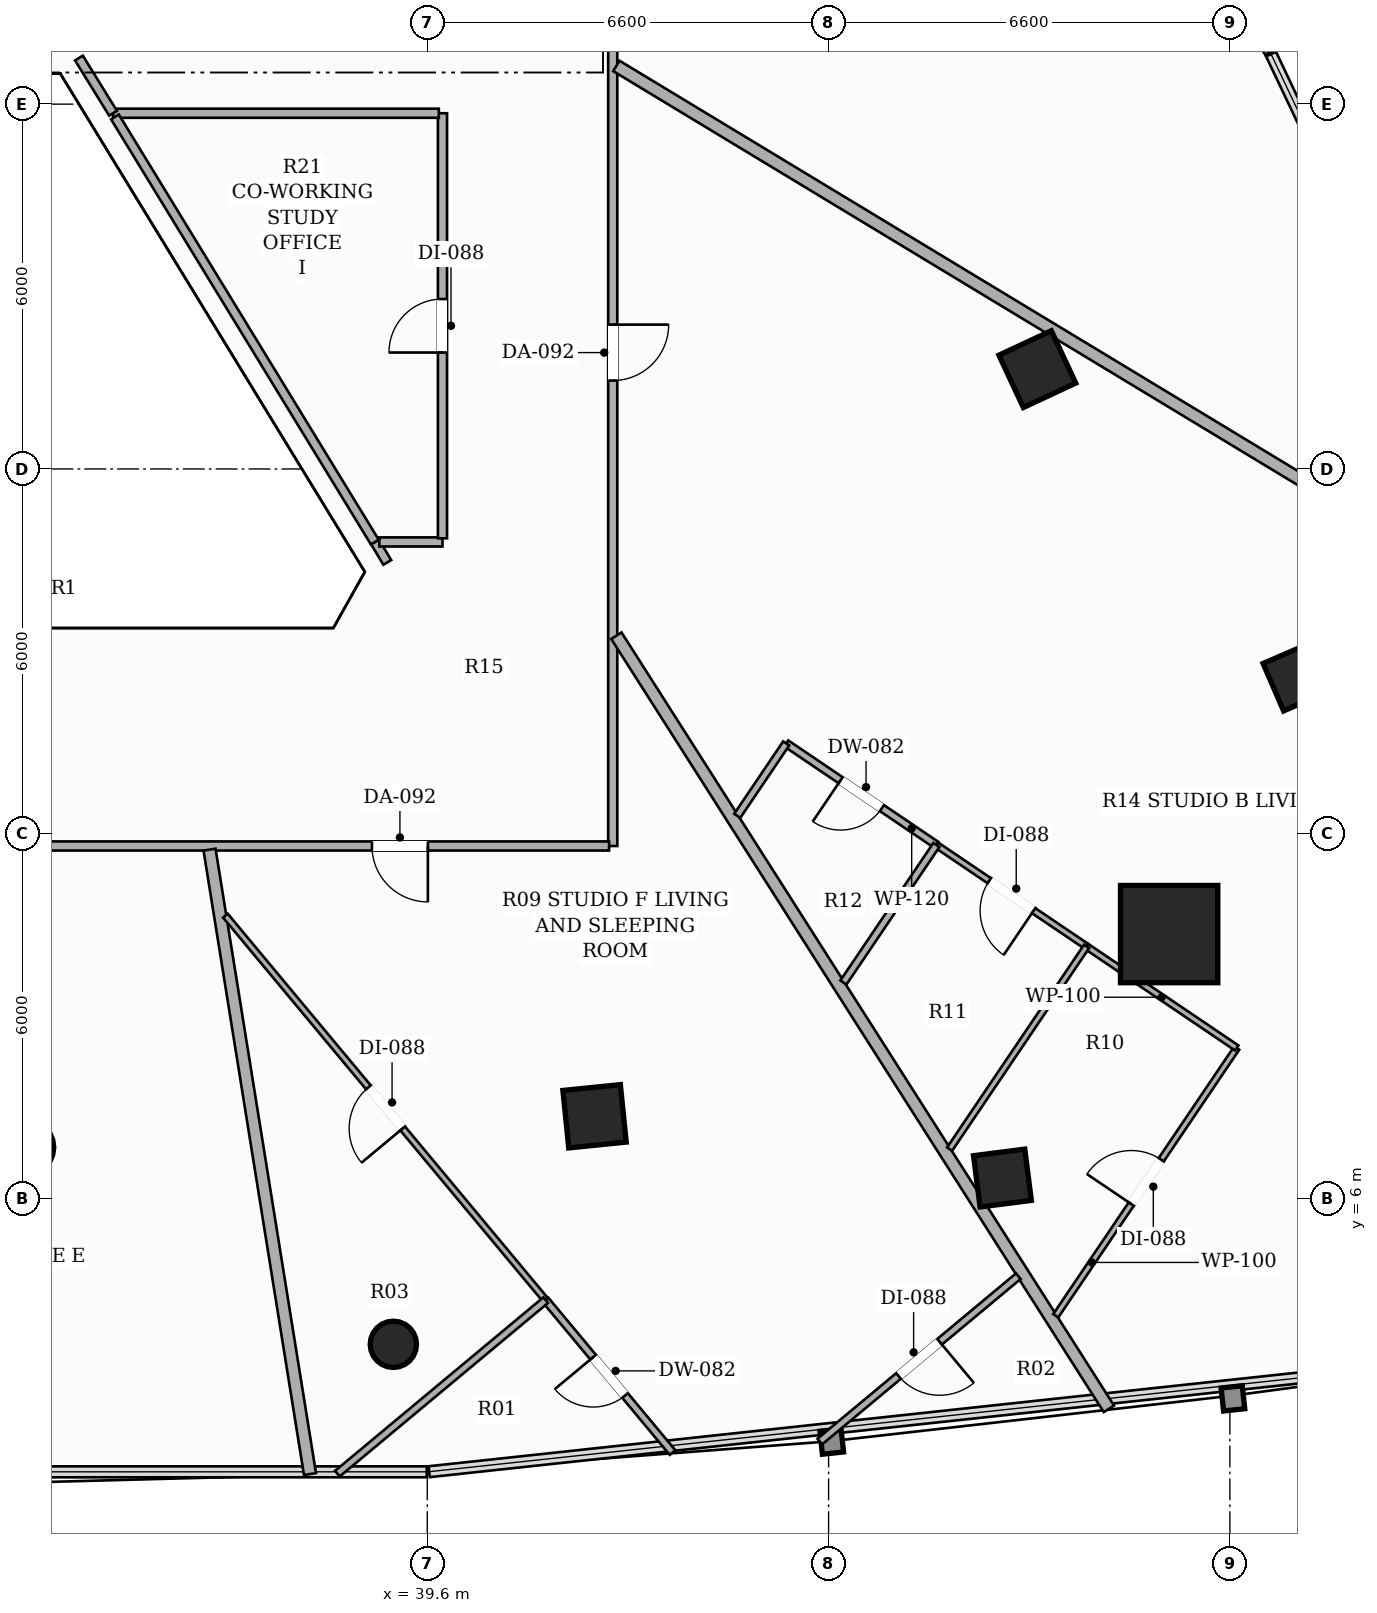
"""IFC4 building model, lengths in metres.
Left out: names, types, materials, properties, quantities, classifications, styles, units other than length and angle.
Written with IfcOpenShell. Run it as: python <this file> out.ifc"""

import sys

from ifc_helpers import new_model, si_unit, direction, frame, frame_2d, origin, origin_2d, place, context, subcontext, project, spatial, rectangle, hollow_rectangle, hollow_circle, extrude, element, fill, save


model = new_model("IFC4")
c1 = context("Model", 3, precision=1e-05, world=origin(), true_north=direction((0.0, 1.0)))
c2 = subcontext(c1, "Body", "Model", "MODEL_VIEW")
j1 = project(units=[si_unit("LENGTHUNIT", "METRE"), si_unit("PLANEANGLEUNIT", "RADIAN")], contexts=[c1])
p1 = place(None, origin())
s1 = spatial("IfcSite", under=j1, at=p1, CompositionType="ELEMENT")
p2 = place(p1, origin())
s2 = spatial("IfcBuilding", under=s1, at=p2, CompositionType="ELEMENT")
p3 = place(p2, frame((0.0, 0.0, 50.0)))
s3 = spatial("IfcBuildingStorey", under=s2, at=p3, CompositionType="ELEMENT", Elevation=50.0)
p4 = place(p3, frame((51.801, 10.351, 0.0), z_axis=(0.0, 0.0, 1.0), x_axis=(1.0, 0.0, 0.0)))
e1 = element("IfcColumn", 1, at=p4, inside=s3, PredefinedType="COLUMN", context=c2, shape_type="SweptSolid", body=[
    extrude(hollow_rectangle(XDim=1.6, YDim=1.6, WallThickness=0.05, at=origin_2d()), origin(), (0.0, 0.0, 1.0), 3.3),
])
p5 = place(p3, frame((33.0, 6.844, 0.0), z_axis=(0.0, 0.0, 1.0), x_axis=(1.0, 0.0, 0.0)))
e2 = element("IfcColumn", 2, at=p5, inside=s3, PredefinedType="COLUMN", context=c2, shape_type="SweptSolid", body=[
    extrude(hollow_circle(Radius=0.457, WallThickness=0.025, at=origin_2d()), origin(), (0.0, 0.0, 1.0), 3.3),
])
for number, where, z_axis, x_axis in (
    (3, (42.351, 7.355, 0.0), (0.0, 0.0, 1.0), (0.995, 0.101, 0.0)),
    (4, (49.633, 19.642, 0.0), (0.0, 0.0, 1.0), (-0.423, 0.906, 0.0)),
):
    element("IfcColumn", number, at=place(p3, frame(where, z_axis=z_axis, x_axis=x_axis)), inside=s3, PredefinedType="COLUMN", context=c2, shape_type="SweptSolid", body=[
        extrude(hollow_rectangle(XDim=0.95, YDim=0.95, WallThickness=0.032, at=origin_2d()), origin(), (0.0, 0.0, 1.0), 3.3),
    ])
for number, where, z_axis, x_axis in (
    (5, (49.059, 6.339, 0.0), (0.0, 0.0, 1.0), (0.992, 0.127, 0.0)),
    (6, (53.905, 14.58, 0.0), (0.0, 0.0, 1.0), (-0.397, 0.918, 0.0)),
):
    element("IfcColumn", number, at=place(p3, frame(where, z_axis=z_axis, x_axis=x_axis)), inside=s3, PredefinedType="COLUMN", context=c2, shape_type="SweptSolid", body=[
        extrude(hollow_rectangle(XDim=0.85, YDim=0.85, WallThickness=0.028, at=origin_2d()), origin(), (0.0, 0.0, 1.0), 3.3),
    ])
p6 = place(p3, frame((39.042, 3.605, 0.0), z_axis=(0.0, 0.0, 1.0), x_axis=(1.0, 0.0, 0.0)))
e7 = element("IfcColumn", 7, at=p6, inside=s3, PredefinedType="COLUMN", context=c2, shape_type="SweptSolid", body=[
    extrude(hollow_circle(Radius=0.381, WallThickness=0.022, at=origin_2d()), origin(), (0.0, 0.0, 1.0), 3.3),
])
p7 = place(p3, frame((42.65, 36.84, 0.0), z_axis=(0.0, 0.0, 1.0), x_axis=(0.0, -1.0, 0.0)))
e8 = element("IfcWall", 8, at=p7, inside=s3, PredefinedType="PARTITIONING", context=c2, shape_type="SweptSolid", body=[
    extrude(rectangle(XDim=25.04, YDim=0.15, at=frame_2d((12.52, 0.0))), origin(), (0.0, 0.0, 1.0), 2.413),
])
p8 = place(p7, frame((16.466, 0.0, 0.0)))
e9 = element("IfcOpeningElement", 9, at=p8, cuts=e8, PredefinedType="OPENING", context=c2, shape_type="SweptSolid", body=[
    extrude(rectangle(XDim=0.92, YDim=2.15, at=frame_2d((0.46, 1.075))), frame((0.0, 0.085, 0.0), z_axis=(0.0, -1.0, 0.0), x_axis=(1.0, 0.0, 0.0)), (0.0, 0.0, 1.0), 0.17),
])
p9 = place(p7, frame((5.796, 0.0, 0.0)))
e10 = element("IfcOpeningElement", 10, at=p9, cuts=e8, PredefinedType="OPENING", context=c2, shape_type="SweptSolid", body=[
    extrude(rectangle(XDim=0.92, YDim=2.15, at=frame_2d((0.46, 1.075))), frame((0.0, 0.085, 0.0), z_axis=(0.0, -1.0, 0.0), x_axis=(1.0, 0.0, 0.0)), (0.0, 0.0, 1.0), 0.17),
])
p10 = place(p3, frame((42.59, 11.8, 0.0), z_axis=(0.0, 0.0, 1.0), x_axis=(-1.0, 0.0, 0.0)))
e11 = element("IfcWall", 11, at=p10, inside=s3, PredefinedType="PARTITIONING", context=c2, shape_type="SweptSolid", body=[
    extrude(rectangle(XDim=19.24, YDim=0.15, at=frame_2d((9.62, 0.0))), origin(), (0.0, 0.0, 1.0), 2.669),
])
p11 = place(p10, frame((10.508, 0.0, 0.0)))
e12 = element("IfcOpeningElement", 12, at=p11, cuts=e11, PredefinedType="OPENING", context=c2, shape_type="SweptSolid", body=[
    extrude(rectangle(XDim=0.88, YDim=2.1, at=frame_2d((0.44, 1.05))), frame((0.0, 0.085, 0.0), z_axis=(0.0, -1.0, 0.0), x_axis=(1.0, 0.0, 0.0)), (0.0, 0.0, 1.0), 0.17),
])
p12 = place(p10, frame((2.98, 0.0, 0.0)))
e13 = element("IfcOpeningElement", 13, at=p12, cuts=e11, PredefinedType="OPENING", context=c2, shape_type="SweptSolid", body=[
    extrude(rectangle(XDim=0.92, YDim=2.15, at=frame_2d((0.46, 1.075))), frame((0.0, 0.085, 0.0), z_axis=(0.0, -1.0, 0.0), x_axis=(1.0, 0.0, 0.0)), (0.0, 0.0, 1.0), 0.17),
])
p13 = place(p3, frame((38.942, 16.463, 0.0), z_axis=(0.0, 0.0, 1.0), x_axis=(-0.511932152937, 0.859025884819, 0.0)))
e14 = element("IfcWall", 14, at=p13, inside=s3, PredefinedType="PARTITIONING", context=c2, shape_type="SweptSolid", body=[
    extrude(rectangle(XDim=0.393, YDim=0.15, at=frame_2d((0.196, 0.0))), origin(), (0.0, 0.0, 1.0), 3.06),
])
p14 = place(p3, frame((38.811, 16.8, 0.0), z_axis=(0.0, 0.0, 1.0), x_axis=(1.0, 0.0, 0.0)))
e15 = element("IfcWall", 15, at=p14, inside=s3, PredefinedType="PARTITIONING", context=c2, shape_type="SweptSolid", body=[
    extrude(rectangle(XDim=1.039, YDim=0.15, at=frame_2d((0.52, 0.0))), origin(), (0.0, 0.0, 1.0), 3.06),
])
p15 = place(p3, frame((39.85, 16.86, 0.0), z_axis=(0.0, 0.0, 1.0), x_axis=(0.0, 1.0, 0.0)))
e16 = element("IfcWall", 16, at=p15, inside=s3, PredefinedType="PARTITIONING", context=c2, shape_type="SweptSolid", body=[
    extrude(rectangle(XDim=6.99, YDim=0.15, at=frame_2d((3.495, 0.0))), origin(), (0.0, 0.0, 1.0), 2.669),
])
p16 = place(p15, frame((3.055, 0.0, 0.0)))
e17 = element("IfcOpeningElement", 17, at=p16, cuts=e16, PredefinedType="OPENING", context=c2, shape_type="SweptSolid", body=[
    extrude(rectangle(XDim=0.88, YDim=2.1, at=frame_2d((0.44, 1.05))), frame((0.0, 0.085, 0.0), z_axis=(0.0, -1.0, 0.0), x_axis=(1.0, 0.0, 0.0)), (0.0, 0.0, 1.0), 0.17),
])
p17 = place(p3, frame((39.79, 23.85, 0.0), z_axis=(0.0, 0.0, 1.0), x_axis=(-1.0, 0.0, 0.0)))
e18 = element("IfcWall", 18, at=p17, inside=s3, PredefinedType="PARTITIONING", context=c2, shape_type="SweptSolid", body=[
    extrude(rectangle(XDim=5.358, YDim=0.15, at=frame_2d((2.679, 0.0))), origin(), (0.0, 0.0, 1.0), 2.669),
])
p18 = place(p3, frame((34.432, 23.85, 0.0), z_axis=(0.0, 0.0, 1.0), x_axis=(-0.525488010188, 0.850801005611, 0.0)))
e19 = element("IfcWall", 19, at=p18, inside=s3, PredefinedType="PARTITIONING", context=c2, shape_type="SweptSolid", body=[
    extrude(rectangle(XDim=1.067, YDim=0.15, at=frame_2d((0.534, 0.0))), origin(), (0.0, 0.0, 1.0), 3.06),
])
p19 = place(p3, frame((34.463, 23.79, 0.0), z_axis=(0.0, 0.0, 1.0), x_axis=(0.521566895949, -0.853210392019, 0.0)))
e20 = element("IfcWall", 20, at=p19, inside=s3, PredefinedType="PARTITIONING", context=c2, shape_type="SweptSolid", body=[
    extrude(rectangle(XDim=8.195, YDim=0.15, at=frame_2d((4.097, 0.0))), origin(), (0.0, 0.0, 1.0), 2.669),
])
p20 = place(p3, frame((42.71, 24.628, 0.0), z_axis=(0.0, 0.0, 1.0), x_axis=(0.85570509792, -0.517463801047, 0.0)))
e21 = element("IfcWall", 21, at=p20, inside=s3, PredefinedType="PARTITIONING", context=c2, shape_type="SweptSolid", body=[
    extrude(rectangle(XDim=17.86, YDim=0.2, at=frame_2d((8.93, 0.0))), origin(), (0.0, 0.0, 1.0), 2.413),
])
p21 = place(p3, frame((50.81, 2.544, 0.0), z_axis=(0.0, 0.0, 1.0), x_axis=(-0.537314491885, 0.843381963769, 0.0)))
e22 = element("IfcWall", 22, at=p21, inside=s3, PredefinedType="PARTITIONING", context=c2, shape_type="SweptSolid", body=[
    extrude(rectangle(XDim=15.075, YDim=0.2, at=frame_2d((7.538, 0.0))), origin(), (0.0, 0.0, 1.0), 2.413),
])
p22 = place(p3, frame((36.019, 11.74, 0.0), z_axis=(0.0, 0.0, 1.0), x_axis=(0.158816201081, -0.98730816581, 0.0)))
e23 = element("IfcWall", 23, at=p22, inside=s3, PredefinedType="PARTITIONING", context=c2, shape_type="SweptSolid", body=[
    extrude(rectangle(XDim=10.401, YDim=0.2, at=frame_2d((5.201, 0.0))), origin(), (0.0, 0.0, 1.0), 2.413),
])
p23 = place(p3, frame((47.973, 11.817, 0.0), z_axis=(0.0, 0.0, 1.0), x_axis=(-0.82839181121, 0.560149093653, 0.0)))
e24 = element("IfcWall", 24, at=p23, inside=s3, PredefinedType="PARTITIONING", context=c2, shape_type="SweptSolid", body=[
    extrude(rectangle(XDim=2.982, YDim=0.12, at=frame_2d((1.491, 0.0))), origin(), (0.0, 0.0, 1.0), 2.669),
])
p24 = place(p23, frame((1.081, 0.0, 0.0)))
e25 = element("IfcOpeningElement", 25, at=p24, cuts=e24, PredefinedType="OPENING", context=c2, shape_type="SweptSolid", body=[
    extrude(rectangle(XDim=0.82, YDim=2.1, at=frame_2d((0.41, 1.05))), frame((0.0, 0.07, 0.0), z_axis=(0.0, -1.0, 0.0), x_axis=(1.0, 0.0, 0.0)), (0.0, 0.0, 1.0), 0.14),
])
p25 = place(p3, frame((45.503, 13.487, 0.0), z_axis=(0.0, 0.0, 1.0), x_axis=(-0.559901526605, -0.828559159328, 0.0)))
e26 = element("IfcWall", 26, at=p25, inside=s3, PredefinedType="PARTITIONING", context=c2, shape_type="SweptSolid", body=[
    extrude(rectangle(XDim=1.438, YDim=0.12, at=frame_2d((0.719, 0.0))), origin(), (0.0, 0.0, 1.0), 2.669),
])
p26 = place(p3, frame((49.936, 4.074, 0.0), z_axis=(0.0, 0.0, 1.0), x_axis=(0.560030395854, 0.828472060917, 0.0)))
e27 = element("IfcWall", 27, at=p26, inside=s3, PredefinedType="PARTITIONING", context=c2, shape_type="SweptSolid", body=[
    extrude(rectangle(XDim=5.316, YDim=0.1, at=frame_2d((2.658, 0.0))), origin(), (0.0, 0.0, 1.0), 3.06),
])
p27 = place(p26, frame((2.218, 0.0, 0.0)))
e28 = element("IfcOpeningElement", 28, at=p27, cuts=e27, PredefinedType="OPENING", context=c2, shape_type="SweptSolid", body=[
    extrude(rectangle(XDim=0.88, YDim=2.1, at=frame_2d((0.44, 1.05))), frame((0.0, 0.06, 0.0), z_axis=(0.0, -1.0, 0.0), x_axis=(1.0, 0.0, 0.0)), (0.0, 0.0, 1.0), 0.12),
])
p28 = place(p3, frame((52.913, 8.478, 0.0), z_axis=(0.0, 0.0, 1.0), x_axis=(-0.828429805787, 0.560092900226, 0.0)))
e29 = element("IfcWall", 29, at=p28, inside=s3, PredefinedType="PARTITIONING", context=c2, shape_type="SweptSolid", body=[
    extrude(rectangle(XDim=2.981, YDim=0.1, at=frame_2d((1.491, 0.0))), origin(), (0.0, 0.0, 1.0), 2.413),
])
p29 = place(p3, frame((50.443, 10.148, 0.0), z_axis=(0.0, 0.0, 1.0), x_axis=(-0.828607449923, 0.559830058082, 0.0)))
e30 = element("IfcWall", 30, at=p29, inside=s3, PredefinedType="PARTITIONING", context=c2, shape_type="SweptSolid", body=[
    extrude(rectangle(XDim=2.981, YDim=0.1, at=frame_2d((1.491, 0.0))), origin(), (0.0, 0.0, 1.0), 3.06),
])
p30 = place(p29, frame((1.051, 0.0, 0.0)))
e31 = element("IfcOpeningElement", 31, at=p30, cuts=e30, PredefinedType="OPENING", context=c2, shape_type="SweptSolid", body=[
    extrude(rectangle(XDim=0.88, YDim=2.1, at=frame_2d((0.44, 1.05))), frame((0.0, 0.06, 0.0), z_axis=(0.0, -1.0, 0.0), x_axis=(1.0, 0.0, 0.0)), (0.0, 0.0, 1.0), 0.12),
])
p31 = place(p3, frame((47.973, 11.817, 0.0), z_axis=(0.0, 0.0, 1.0), x_axis=(-0.559971898906, -0.828511600665, 0.0)))
e32 = element("IfcWall", 32, at=p31, inside=s3, PredefinedType="PARTITIONING", context=c2, shape_type="SweptSolid", body=[
    extrude(rectangle(XDim=2.73, YDim=0.12, at=frame_2d((1.365, 0.0))), origin(), (0.0, 0.0, 1.0), 2.669),
])
p32 = place(p3, frame((48.19, 6.815, 0.0), z_axis=(0.0, 0.0, 1.0), x_axis=(0.560052199206, 0.828457321873, 0.0)))
e33 = element("IfcWall", 33, at=p32, inside=s3, PredefinedType="PARTITIONING", context=c2, shape_type="SweptSolid", body=[
    extrude(rectangle(XDim=4.023, YDim=0.1, at=frame_2d((2.012, 0.0))), origin(), (0.0, 0.0, 1.0), 2.413),
])
p33 = place(p3, frame((43.634, 1.825, 0.0), z_axis=(0.0, 0.0, 1.0), x_axis=(-0.639911914418, 0.768448268777, 0.0)))
e34 = element("IfcWall", 34, at=p33, inside=s3, PredefinedType="PARTITIONING", context=c2, shape_type="SweptSolid", body=[
    extrude(rectangle(XDim=3.261, YDim=0.12, at=frame_2d((1.631, 0.0))), origin(), (0.0, 0.0, 1.0), 3.06),
])
p34 = place(p33, frame((1.221, 0.0, 0.0)))
e35 = element("IfcOpeningElement", 35, at=p34, cuts=e34, PredefinedType="OPENING", context=c2, shape_type="SweptSolid", body=[
    extrude(rectangle(XDim=0.82, YDim=2.1, at=frame_2d((0.41, 1.05))), frame((0.0, 0.07, 0.0), z_axis=(0.0, -1.0, 0.0), x_axis=(1.0, 0.0, 0.0)), (0.0, 0.0, 1.0), 0.14),
])
p35 = place(p3, frame((49.32, 4.725, 0.0), z_axis=(0.0, 0.0, 1.0), x_axis=(-0.768353158093, -0.640026112317, 0.0)))
e36 = element("IfcWall", 36, at=p35, inside=s3, PredefinedType="PARTITIONING", context=c2, shape_type="SweptSolid", body=[
    extrude(rectangle(XDim=4.248, YDim=0.12, at=frame_2d((2.124, 0.0))), origin(), (0.0, 0.0, 1.0), 3.06),
])
p36 = place(p35, frame((1.684, 0.0, 0.0)))
e37 = element("IfcOpeningElement", 37, at=p36, cuts=e36, PredefinedType="OPENING", context=c2, shape_type="SweptSolid", body=[
    extrude(rectangle(XDim=0.88, YDim=2.1, at=frame_2d((0.44, 1.05))), frame((0.0, 0.07, 0.0), z_axis=(0.0, -1.0, 0.0), x_axis=(1.0, 0.0, 0.0)), (0.0, 0.0, 1.0), 0.14),
])
p37 = place(p3, frame((41.547, 4.331, 0.0), z_axis=(0.0, 0.0, 1.0), x_axis=(-0.640035566376, 0.768345282913, 0.0)))
e38 = element("IfcWall", 38, at=p37, inside=s3, PredefinedType="PARTITIONING", context=c2, shape_type="SweptSolid", body=[
    extrude(rectangle(XDim=8.229, YDim=0.1, at=frame_2d((4.115, 0.0))), origin(), (0.0, 0.0, 1.0), 2.413),
])
p38 = place(p37, frame((3.675, 0.0, 0.0)))
e39 = element("IfcOpeningElement", 39, at=p38, cuts=e38, PredefinedType="OPENING", context=c2, shape_type="SweptSolid", body=[
    extrude(rectangle(XDim=0.88, YDim=2.1, at=frame_2d((0.44, 1.05))), frame((0.0, 0.06, 0.0), z_axis=(0.0, -1.0, 0.0), x_axis=(1.0, 0.0, 0.0)), (0.0, 0.0, 1.0), 0.12),
])
p39 = place(p3, frame((38.122, 1.478, 0.0), z_axis=(0.0, 0.0, 1.0), x_axis=(0.768351451836, 0.640028160678, 0.0)))
e40 = element("IfcWall", 40, at=p39, inside=s3, PredefinedType="PARTITIONING", context=c2, shape_type="SweptSolid", body=[
    extrude(rectangle(XDim=4.458, YDim=0.12, at=frame_2d((2.229, 0.0))), origin(), (0.0, 0.0, 1.0), 3.06),
])
p40 = place(p8, origin())
e41 = element("IfcDoor", 41, at=p40, inside=s3, OperationType="SINGLE_SWING_LEFT", PredefinedType="DOOR", context=c2, shape_type="SweptSolid", body=[
    extrude(rectangle(XDim=0.92, YDim=2.15, at=frame_2d((0.46, 1.075))), frame((0.0, 0.025, 0.0), z_axis=(0.0, -1.0, 0.0), x_axis=(1.0, 0.0, 0.0)), (0.0, 0.0, 1.0), 0.05),
])
fill(e9, e41)
p41 = place(p24, origin())
e42 = element("IfcDoor", 42, at=p41, inside=s3, OperationType="SINGLE_SWING_RIGHT", PredefinedType="DOOR", context=c2, shape_type="SweptSolid", body=[
    extrude(rectangle(XDim=0.82, YDim=2.1, at=frame_2d((0.41, 1.05))), frame((0.0, 0.025, 0.0), z_axis=(0.0, -1.0, 0.0), x_axis=(1.0, 0.0, 0.0)), (0.0, 0.0, 1.0), 0.05),
])
fill(e25, e42)
p42 = place(p27, origin())
e43 = element("IfcDoor", 43, at=p42, inside=s3, OperationType="SINGLE_SWING_LEFT", PredefinedType="DOOR", context=c2, shape_type="SweptSolid", body=[
    extrude(rectangle(XDim=0.88, YDim=2.1, at=frame_2d((0.44, 1.05))), frame((0.0, 0.025, 0.0), z_axis=(0.0, -1.0, 0.0), x_axis=(1.0, 0.0, 0.0)), (0.0, 0.0, 1.0), 0.05),
])
fill(e28, e43)
p43 = place(p30, origin())
e44 = element("IfcDoor", 44, at=p43, inside=s3, OperationType="SINGLE_SWING_LEFT", PredefinedType="DOOR", context=c2, shape_type="SweptSolid", body=[
    extrude(rectangle(XDim=0.88, YDim=2.1, at=frame_2d((0.44, 1.05))), frame((0.0, 0.025, 0.0), z_axis=(0.0, -1.0, 0.0), x_axis=(1.0, 0.0, 0.0)), (0.0, 0.0, 1.0), 0.05),
])
fill(e31, e44)
p44 = place(p12, origin())
e45 = element("IfcDoor", 45, at=p44, inside=s3, OperationType="SINGLE_SWING_LEFT", PredefinedType="DOOR", context=c2, shape_type="SweptSolid", body=[
    extrude(rectangle(XDim=0.92, YDim=2.15, at=frame_2d((0.46, 1.075))), frame((0.0, 0.025, 0.0), z_axis=(0.0, -1.0, 0.0), x_axis=(1.0, 0.0, 0.0)), (0.0, 0.0, 1.0), 0.05),
])
fill(e13, e45)
p45 = place(p34, origin())
e46 = element("IfcDoor", 46, at=p45, inside=s3, OperationType="SINGLE_SWING_RIGHT", PredefinedType="DOOR", context=c2, shape_type="SweptSolid", body=[
    extrude(rectangle(XDim=0.82, YDim=2.1, at=frame_2d((0.41, 1.05))), frame((0.0, 0.025, 0.0), z_axis=(0.0, -1.0, 0.0), x_axis=(1.0, 0.0, 0.0)), (0.0, 0.0, 1.0), 0.05),
])
fill(e35, e46)
p46 = place(p36, origin())
e47 = element("IfcDoor", 47, at=p46, inside=s3, OperationType="SINGLE_SWING_LEFT", PredefinedType="DOOR", context=c2, shape_type="SweptSolid", body=[
    extrude(rectangle(XDim=0.88, YDim=2.1, at=frame_2d((0.44, 1.05))), frame((0.0, 0.025, 0.0), z_axis=(0.0, -1.0, 0.0), x_axis=(1.0, 0.0, 0.0)), (0.0, 0.0, 1.0), 0.05),
])
fill(e37, e47)
p47 = place(p38, origin())
e48 = element("IfcDoor", 48, at=p47, inside=s3, OperationType="SINGLE_SWING_LEFT", PredefinedType="DOOR", context=c2, shape_type="SweptSolid", body=[
    extrude(rectangle(XDim=0.88, YDim=2.1, at=frame_2d((0.44, 1.05))), frame((0.0, 0.025, 0.0), z_axis=(0.0, -1.0, 0.0), x_axis=(1.0, 0.0, 0.0)), (0.0, 0.0, 1.0), 0.05),
])
fill(e39, e48)
p48 = place(p16, origin())
e49 = element("IfcDoor", 49, at=p48, inside=s3, OperationType="SINGLE_SWING_LEFT", PredefinedType="DOOR", context=c2, shape_type="SweptSolid", body=[
    extrude(rectangle(XDim=0.88, YDim=2.1, at=frame_2d((0.44, 1.05))), frame((0.0, 0.025, 0.0), z_axis=(0.0, -1.0, 0.0), x_axis=(1.0, 0.0, 0.0)), (0.0, 0.0, 1.0), 0.05),
])
fill(e17, e49)
save(model, sys.argv[1])
